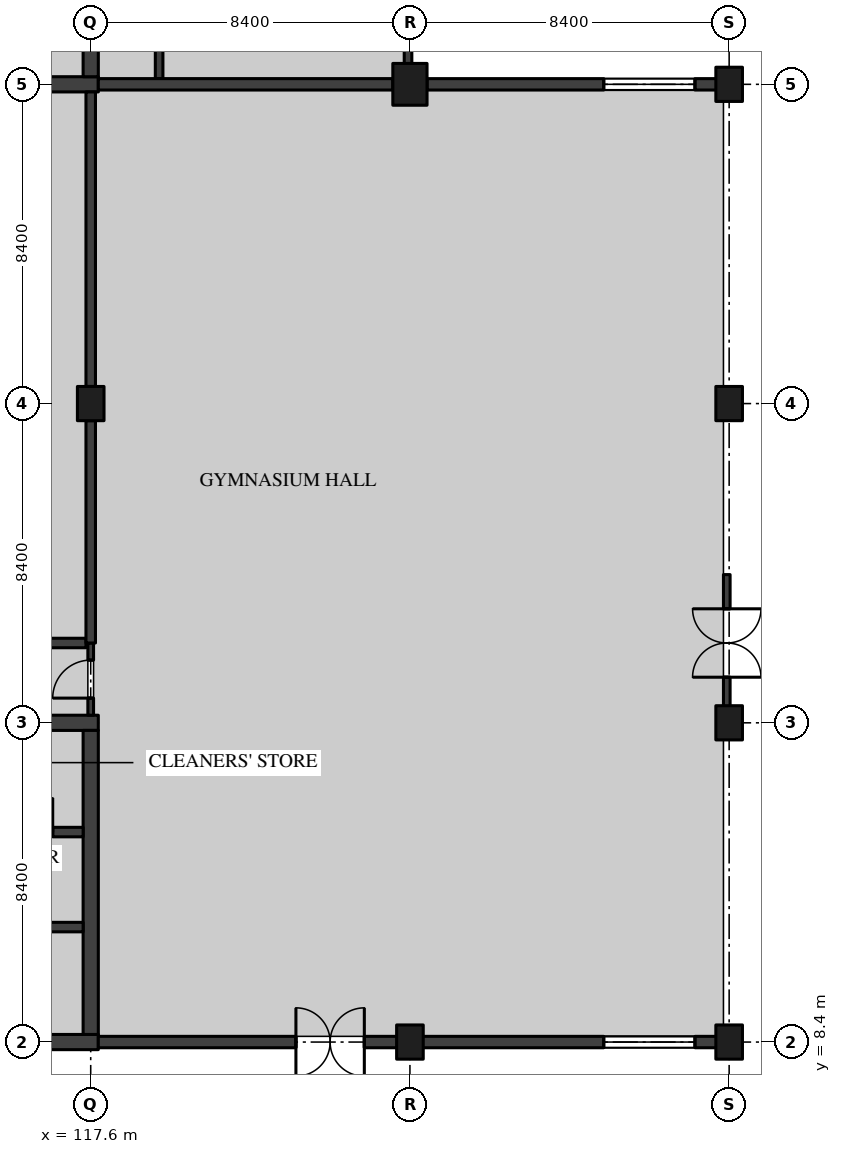
"""IFC4 building model, lengths in metres.
Left out: names, types, materials, properties, quantities, classifications, styles, units other than length and angle.
Written with IfcOpenShell. Run it as: python <this file> out.ifc"""

import sys

from ifc_helpers import new_model, si_unit, direction, frame, frame_2d, origin, origin_2d, place, context, subcontext, project, spatial, rectangle, extrude, element, fill, save


model = new_model("IFC4")
c1 = context("Model", 3, precision=1e-05, world=origin(), true_north=direction((0.0, 1.0)))
c2 = subcontext(c1, "Body", "Model", "MODEL_VIEW")
j1 = project(units=[si_unit("LENGTHUNIT", "METRE"), si_unit("PLANEANGLEUNIT", "RADIAN")], contexts=[c1])
p1 = place(None, origin())
s1 = spatial("IfcSite", under=j1, at=p1, CompositionType="ELEMENT")
p2 = place(p1, origin())
s2 = spatial("IfcBuilding", under=s1, at=p2, CompositionType="ELEMENT")
p3 = place(p2, origin())
s3 = spatial("IfcBuildingStorey", under=s2, at=p3, CompositionType="ELEMENT", Elevation=0.0)
p4 = place(p3, frame((117.6, 25.2, 0.0), z_axis=(0.0, 0.0, 1.0), x_axis=(1.0, 0.0, 0.0)))
e1 = element("IfcColumn", 1, at=p4, inside=s3, PredefinedType="COLUMN", context=c2, shape_type="SweptSolid", body=[
    extrude(rectangle(XDim=0.7, YDim=0.9, at=origin_2d()), origin(), (0.0, 0.0, 1.0), 5.05),
])
p5 = place(p3, frame((126.0, 8.4, 0.0), z_axis=(0.0, 0.0, 1.0), x_axis=(1.0, 0.0, 0.0)))
e2 = element("IfcColumn", 2, at=p5, inside=s3, PredefinedType="COLUMN", context=c2, shape_type="SweptSolid", body=[
    extrude(rectangle(XDim=0.7, YDim=0.9, at=origin_2d()), origin(), (0.0, 0.0, 1.0), 5.4),
])
p6 = place(p3, frame((126.0, 33.6, 0.0), z_axis=(0.0, 0.0, 1.0), x_axis=(1.0, 0.0, 0.0)))
e3 = element("IfcColumn", 3, at=p6, inside=s3, PredefinedType="COLUMN", context=c2, shape_type="SweptSolid", body=[
    extrude(rectangle(XDim=0.9, YDim=1.1, at=origin_2d()), origin(), (0.0, 0.0, 1.0), 5.05),
])
for number, where, z_axis, x_axis in (
    (4, (134.4, 8.4, 0.0), (0.0, 0.0, 1.0), (1.0, 0.0, 0.0)),
    (5, (134.4, 16.8, 0.0), (0.0, 0.0, 1.0), (1.0, 0.0, 0.0)),
    (6, (134.4, 25.2, 0.0), (0.0, 0.0, 1.0), (1.0, 0.0, 0.0)),
    (7, (134.4, 33.6, 0.0), (0.0, 0.0, 1.0), (1.0, 0.0, 0.0)),
):
    element("IfcColumn", number, at=place(p3, frame(where, z_axis=z_axis, x_axis=x_axis)), inside=s3, PredefinedType="COLUMN", context=c2, shape_type="SweptSolid", body=[
        extrude(rectangle(XDim=0.7, YDim=0.9, at=origin_2d()), origin(), (0.0, 0.0, 1.0), 5.4),
    ])
p7 = place(p3, frame((109.0, 8.4, 0.0), z_axis=(0.0, 0.0, 1.0), x_axis=(1.0, 0.0, 0.0)))
e8 = element("IfcWall", 8, at=p7, inside=s3, PredefinedType="SHEAR", context=c2, shape_type="SweptSolid", body=[
    extrude(rectangle(XDim=8.8, YDim=0.4, at=frame_2d((4.4, 0.0))), origin(), (0.0, 0.0, 1.0), 5.05),
])
p8 = place(p7, frame((0.55, 0.0, 0.0)))
e9 = element("IfcOpeningElement", 9, at=p8, cuts=e8, PredefinedType="OPENING", context=c2, shape_type="SweptSolid", body=[
    extrude(rectangle(XDim=1.2, YDim=2.1, at=frame_2d((0.6, 1.05))), frame((0.0, 0.21, 0.0), z_axis=(0.0, -1.0, 0.0), x_axis=(1.0, 0.0, 0.0)), (0.0, 0.0, 1.0), 0.42),
])
p9 = place(p3, frame((109.0, 16.8, 0.0), z_axis=(0.0, 0.0, 1.0), x_axis=(1.0, 0.0, 0.0)))
e10 = element("IfcWall", 10, at=p9, inside=s3, PredefinedType="SHEAR", context=c2, shape_type="SweptSolid", body=[
    extrude(rectangle(XDim=8.8, YDim=0.4, at=frame_2d((4.4, 0.0))), origin(), (0.0, 0.0, 1.0), 5.05),
])
p10 = place(p9, frame((1.0, 0.0, 0.0)))
e11 = element("IfcOpeningElement", 11, at=p10, cuts=e10, PredefinedType="OPENING", context=c2, shape_type="SweptSolid", body=[
    extrude(rectangle(XDim=1.2, YDim=2.1, at=frame_2d((0.6, 1.05))), frame((0.0, 0.21, 0.0), z_axis=(0.0, -1.0, 0.0), x_axis=(1.0, 0.0, 0.0)), (0.0, 0.0, 1.0), 0.42),
])
p11 = place(p3, frame((117.6, 8.6, 0.0), z_axis=(0.0, 0.0, 1.0), x_axis=(0.0, 1.0, 0.0)))
e12 = element("IfcWall", 12, at=p11, inside=s3, PredefinedType="SHEAR", context=c2, shape_type="SweptSolid", body=[
    extrude(rectangle(XDim=8.0, YDim=0.4, at=frame_2d((4.0, 0.0))), origin(), (0.0, 0.0, 1.0), 5.05),
])
p12 = place(p3, frame((109.4, 11.425, 0.0), z_axis=(0.0, 0.0, 1.0), x_axis=(1.0, 0.0, 0.0)))
e13 = element("IfcWall", 13, at=p12, inside=s3, PredefinedType="SOLIDWALL", context=c2, shape_type="SweptSolid", body=[
    extrude(rectangle(XDim=8.0, YDim=0.25, at=frame_2d((4.0, 0.0))), origin(), (0.0, 0.0, 1.0), 5.05),
])
p13 = place(p12, frame((0.2, 0.0, 0.0)))
e14 = element("IfcOpeningElement", 14, at=p13, cuts=e13, PredefinedType="OPENING", context=c2, shape_type="SweptSolid", body=[
    extrude(rectangle(XDim=1.1, YDim=2.1, at=frame_2d((0.55, 1.05))), frame((0.0, 0.135, 0.0), z_axis=(0.0, -1.0, 0.0), x_axis=(1.0, 0.0, 0.0)), (0.0, 0.0, 1.0), 0.27),
])
p14 = place(p3, frame((112.05, 13.925, 0.0), z_axis=(0.0, 0.0, 1.0), x_axis=(1.0, 0.0, 0.0)))
e15 = element("IfcWall", 15, at=p14, inside=s3, PredefinedType="SOLIDWALL", context=c2, shape_type="SweptSolid", body=[
    extrude(rectangle(XDim=5.35, YDim=0.25, at=frame_2d((2.675, 0.0))), origin(), (0.0, 0.0, 1.0), 5.05),
])
p15 = place(p14, frame((3.65, 0.0, 0.0)))
e16 = element("IfcOpeningElement", 16, at=p15, cuts=e15, PredefinedType="OPENING", context=c2, shape_type="SweptSolid", body=[
    extrude(rectangle(XDim=0.9, YDim=2.1, at=frame_2d((0.45, 1.05))), frame((0.0, 0.135, 0.0), z_axis=(0.0, -1.0, 0.0), x_axis=(1.0, 0.0, 0.0)), (0.0, 0.0, 1.0), 0.27),
])
p16 = place(p14, frame((0.9, 0.0, 0.0)))
e17 = element("IfcOpeningElement", 17, at=p16, cuts=e15, PredefinedType="OPENING", context=c2, shape_type="SweptSolid", body=[
    extrude(rectangle(XDim=0.8, YDim=2.1, at=frame_2d((0.4, 1.05))), frame((0.0, 0.135, 0.0), z_axis=(0.0, -1.0, 0.0), x_axis=(1.0, 0.0, 0.0)), (0.0, 0.0, 1.0), 0.27),
])
p17 = place(p3, frame((109.0, 33.6, 0.0), z_axis=(0.0, 0.0, 1.0), x_axis=(1.0, 0.0, 0.0)))
e18 = element("IfcWall", 18, at=p17, inside=s3, PredefinedType="SHEAR", context=c2, shape_type="SweptSolid", body=[
    extrude(rectangle(XDim=8.8, YDim=0.4, at=frame_2d((4.4, 0.0))), origin(), (0.0, 0.0, 1.0), 5.05),
])
p18 = place(p3, frame((117.6, 33.8, 0.0), z_axis=(0.0, 0.0, 1.0), x_axis=(0.0, 1.0, 0.0)))
e19 = element("IfcWall", 19, at=p18, inside=s3, PredefinedType="SHEAR", context=c2, shape_type="SweptSolid", body=[
    extrude(rectangle(XDim=8.0, YDim=0.4, at=frame_2d((4.0, 0.0))), origin(), (0.0, 0.0, 1.0), 5.05),
])
p19 = place(p18, frame((3.875, 0.0, 0.0)))
e20 = element("IfcOpeningElement", 20, at=p19, cuts=e19, PredefinedType="OPENING", context=c2, shape_type="SweptSolid", body=[
    extrude(rectangle(XDim=1.2, YDim=2.1, at=frame_2d((0.6, 1.05))), frame((0.0, 0.21, 0.0), z_axis=(0.0, -1.0, 0.0), x_axis=(1.0, 0.0, 0.0)), (0.0, 0.0, 1.0), 0.42),
])
p20 = place(p3, frame((117.6, 17.0, 0.0), z_axis=(0.0, 0.0, 1.0), x_axis=(0.0, 1.0, 0.0)))
e21 = element("IfcWall", 21, at=p20, inside=s3, PredefinedType="PARTITIONING", context=c2, shape_type="SweptSolid", body=[
    extrude(rectangle(XDim=1.9, YDim=0.15, at=frame_2d((0.95, 0.0))), origin(), (0.0, 0.0, 1.0), 8.375),
])
p21 = place(p20, frame((0.45, 0.0, 0.0)))
e22 = element("IfcOpeningElement", 22, at=p21, cuts=e21, PredefinedType="OPENING", context=c2, shape_type="SweptSolid", body=[
    extrude(rectangle(XDim=1.0, YDim=2.1, at=frame_2d((0.5, 1.05))), frame((0.0, 0.085, 0.0), z_axis=(0.0, -1.0, 0.0), x_axis=(1.0, 0.0, 0.0)), (0.0, 0.0, 1.0), 0.17),
])
p22 = place(p3, frame((100.925, 18.9, 0.0), z_axis=(0.0, 0.0, 1.0), x_axis=(1.0, 0.0, 0.0)))
e23 = element("IfcWall", 23, at=p22, inside=s3, PredefinedType="PARTITIONING", context=c2, shape_type="SweptSolid", body=[
    extrude(rectangle(XDim=16.55, YDim=0.25, at=frame_2d((8.275, 0.0))), origin(), (0.0, 0.0, 1.0), 5.05),
])
p23 = place(p22, frame((7.65, 0.0, 0.0)))
e24 = element("IfcOpeningElement", 24, at=p23, cuts=e23, PredefinedType="OPENING", context=c2, shape_type="SweptSolid", body=[
    extrude(rectangle(XDim=1.2, YDim=2.1, at=frame_2d((0.6, 1.05))), frame((0.0, 0.135, 0.0), z_axis=(0.0, -1.0, 0.0), x_axis=(1.0, 0.0, 0.0)), (0.0, 0.0, 1.0), 0.27),
])
p24 = place(p3, frame((117.6, 18.9, 0.0), z_axis=(0.0, 0.0, 1.0), x_axis=(0.0, 1.0, 0.0)))
e25 = element("IfcWall", 25, at=p24, inside=s3, PredefinedType="PARTITIONING", context=c2, shape_type="SweptSolid", body=[
    extrude(rectangle(XDim=5.85, YDim=0.25, at=frame_2d((2.925, 0.0))), origin(), (0.0, 0.0, 1.0), 8.375),
])
p25 = place(p3, frame((117.6, 25.65, 0.0), z_axis=(0.0, 0.0, 1.0), x_axis=(0.0, 1.0, 0.0)))
e26 = element("IfcWall", 26, at=p25, inside=s3, PredefinedType="PARTITIONING", context=c2, shape_type="SweptSolid", body=[
    extrude(rectangle(XDim=7.75, YDim=0.25, at=frame_2d((3.875, 0.0))), origin(), (0.0, 0.0, 1.0), 8.375),
])
p26 = place(p3, frame((119.4, 33.75, 0.0), z_axis=(0.0, 0.0, 1.0), x_axis=(0.0, 1.0, 0.0)))
e27 = element("IfcWall", 27, at=p26, inside=s3, PredefinedType="PARTITIONING", context=c2, shape_type="SweptSolid", body=[
    extrude(rectangle(XDim=8.25, YDim=0.2, at=frame_2d((4.125, 0.0))), origin(), (0.0, 0.0, 1.0), 5.05),
])
p27 = place(p26, frame((3.6, 0.0, 0.0)))
e28 = element("IfcOpeningElement", 28, at=p27, cuts=e27, PredefinedType="OPENING", context=c2, shape_type="SweptSolid", body=[
    extrude(rectangle(XDim=1.0, YDim=2.4, at=frame_2d((0.5, 1.2))), frame((0.0, 0.11, 0.0), z_axis=(0.0, -1.0, 0.0), x_axis=(1.0, 0.0, 0.0)), (0.0, 0.0, 1.0), 0.22),
])
p28 = place(p3, frame((117.8, 8.4, 0.0), z_axis=(0.0, 0.0, 1.0), x_axis=(1.0, 0.0, 0.0)))
e29 = element("IfcWall", 29, at=p28, inside=s3, PredefinedType="SOLIDWALL", context=c2, shape_type="SweptSolid", body=[
    extrude(rectangle(XDim=7.87, YDim=0.3, at=frame_2d((3.935, 0.0))), origin(), (0.0, 0.0, 1.0), 5.4),
])
p29 = place(p28, frame((5.2, 0.0, 0.0)))
e30 = element("IfcOpeningElement", 30, at=p29, cuts=e29, PredefinedType="OPENING", context=c2, shape_type="SweptSolid", body=[
    extrude(rectangle(XDim=1.8, YDim=2.4, at=frame_2d((0.9, 1.2))), frame((0.0, 0.16, 0.0), z_axis=(0.0, -1.0, 0.0), x_axis=(1.0, 0.0, 0.0)), (0.0, 0.0, 1.0), 0.32),
])
p30 = place(p3, frame((126.33, 8.4, 0.0), z_axis=(0.0, 0.0, 1.0), x_axis=(1.0, 0.0, 0.0)))
e31 = element("IfcWall", 31, at=p30, inside=s3, PredefinedType="SOLIDWALL", context=c2, shape_type="SweptSolid", body=[
    extrude(rectangle(XDim=7.74, YDim=0.3, at=frame_2d((3.87, 0.0))), origin(), (0.0, 0.0, 1.0), 5.4),
])
p31 = place(p30, frame((4.77, 0.0, 0.6)))
e32 = element("IfcOpeningElement", 32, at=p31, cuts=e31, PredefinedType="OPENING", context=c2, shape_type="SweptSolid", body=[
    extrude(rectangle(XDim=2.4, YDim=2.1, at=frame_2d((1.2, 1.05))), frame((0.0, 0.16, 0.0), z_axis=(0.0, -1.0, 0.0), x_axis=(1.0, 0.0, 0.0)), (0.0, 0.0, 1.0), 0.32),
])
p32 = place(p3, frame((134.337, 17.23, 0.0), z_axis=(0.0, 0.0, 1.0), x_axis=(0.0, 1.0, 0.0)))
e33 = element("IfcWall", 33, at=p32, inside=s3, PredefinedType="SOLIDWALL", context=c2, shape_type="SweptSolid", body=[
    extrude(rectangle(XDim=3.47, YDim=0.175, at=frame_2d((1.735, 0.0))), origin(), (0.0, 0.0, 1.0), 5.4),
])
p33 = place(p32, frame((0.77, 0.0, 0.0)))
e34 = element("IfcOpeningElement", 34, at=p33, cuts=e33, PredefinedType="OPENING", context=c2, shape_type="SweptSolid", body=[
    extrude(rectangle(XDim=1.8, YDim=2.4, at=frame_2d((0.9, 1.2))), frame((0.0, 0.098, 0.0), z_axis=(0.0, -1.0, 0.0), x_axis=(1.0, 0.0, 0.0)), (0.0, 0.0, 1.0), 0.195),
])
p34 = place(p3, frame((126.45, 33.6, 5.05), z_axis=(0.0, 0.0, 1.0), x_axis=(-1.0, 0.0, 0.0)))
e35 = element("IfcWall", 35, at=p34, inside=s3, PredefinedType="SOLIDWALL", context=c2, shape_type="SweptSolid", body=[
    extrude(rectangle(XDim=0.9, YDim=0.3, at=frame_2d((0.45, 0.0))), origin(), (0.0, 0.0, 1.0), 0.35),
])
p35 = place(p3, frame((134.07, 33.6, 0.0), z_axis=(0.0, 0.0, 1.0), x_axis=(-1.0, 0.0, 0.0)))
e36 = element("IfcWall", 36, at=p35, inside=s3, PredefinedType="SOLIDWALL", context=c2, shape_type="SweptSolid", body=[
    extrude(rectangle(XDim=7.62, YDim=0.3, at=frame_2d((3.81, 0.0))), origin(), (0.0, 0.0, 1.0), 5.4),
])
p36 = place(p35, frame((0.57, 0.0, 0.6)))
e37 = element("IfcOpeningElement", 37, at=p36, cuts=e36, PredefinedType="OPENING", context=c2, shape_type="SweptSolid", body=[
    extrude(rectangle(XDim=2.4, YDim=2.1, at=frame_2d((1.2, 1.05))), frame((0.0, 0.16, 0.0), z_axis=(0.0, -1.0, 0.0), x_axis=(1.0, 0.0, 0.0)), (0.0, 0.0, 1.0), 0.32),
])
p37 = place(p3, frame((125.95, 34.13, 0.0), z_axis=(0.0, 0.0, 1.0), x_axis=(0.0, 1.0, 0.0)))
e38 = element("IfcWall", 38, at=p37, inside=s3, PredefinedType="SOLIDWALL", context=c2, shape_type="SweptSolid", body=[
    extrude(rectangle(XDim=3.37, YDim=0.2, at=frame_2d((1.685, 0.0))), origin(), (0.0, 0.0, 1.0), 5.05),
])
p38 = place(p37, frame((0.67, 0.0, 0.0)))
e39 = element("IfcOpeningElement", 39, at=p38, cuts=e38, PredefinedType="OPENING", context=c2, shape_type="SweptSolid", body=[
    extrude(rectangle(XDim=1.8, YDim=2.4, at=frame_2d((0.9, 1.2))), frame((0.0, 0.11, 0.0), z_axis=(0.0, -1.0, 0.0), x_axis=(1.0, 0.0, 0.0)), (0.0, 0.0, 1.0), 0.22),
])
p39 = place(p3, frame((125.55, 33.6, 0.0), z_axis=(0.0, 0.0, 1.0), x_axis=(-1.0, 0.0, 0.0)))
e40 = element("IfcWall", 40, at=p39, inside=s3, PredefinedType="SOLIDWALL", context=c2, shape_type="SweptSolid", body=[
    extrude(rectangle(XDim=7.75, YDim=0.3, at=frame_2d((3.875, 0.0))), origin(), (0.0, 0.0, 1.0), 5.4),
])
p40 = place(p21, origin())
e41 = element("IfcDoor", 41, at=p40, inside=s3, OperationType="SINGLE_SWING_RIGHT", PredefinedType="DOOR", context=c2, shape_type="SweptSolid", body=[
    extrude(rectangle(XDim=1.0, YDim=2.1, at=frame_2d((0.5, 1.05))), frame((0.0, 0.025, 0.0), z_axis=(0.0, -1.0, 0.0), x_axis=(1.0, 0.0, 0.0)), (0.0, 0.0, 1.0), 0.05),
])
fill(e22, e41)
p41 = place(p29, frame((1.8, 0.0, 0.0), z_axis=(0.0, 0.0, 1.0), x_axis=(-1.0, 0.0, 0.0)))
e42 = element("IfcDoor", 42, at=p41, inside=s3, OperationType="DOUBLE_DOOR_DOUBLE_SWING", PredefinedType="DOOR", context=c2, shape_type="SweptSolid", body=[
    extrude(rectangle(XDim=1.8, YDim=2.4, at=frame_2d((0.9, 1.2))), frame((0.0, 0.025, 0.0), z_axis=(0.0, -1.0, 0.0), x_axis=(1.0, 0.0, 0.0)), (0.0, 0.0, 1.0), 0.05),
])
fill(e30, e42)
p42 = place(p31, origin())
e43 = element("IfcWindow", 43, at=p42, inside=s3, PartitioningType="SINGLE_PANEL", PredefinedType="WINDOW", context=c2, shape_type="SweptSolid", body=[
    extrude(rectangle(XDim=2.4, YDim=2.1, at=frame_2d((1.2, 1.05))), frame((0.0, 0.06, 0.0), z_axis=(0.0, -1.0, 0.0), x_axis=(1.0, 0.0, 0.0)), (0.0, 0.0, 1.0), 0.12),
])
fill(e32, e43)
p43 = place(p33, frame((1.8, 0.0, 0.0), z_axis=(0.0, 0.0, 1.0), x_axis=(-1.0, 0.0, 0.0)))
e44 = element("IfcDoor", 44, at=p43, inside=s3, OperationType="DOUBLE_DOOR_DOUBLE_SWING", PredefinedType="DOOR", context=c2, shape_type="SweptSolid", body=[
    extrude(rectangle(XDim=1.8, YDim=2.4, at=frame_2d((0.9, 1.2))), frame((0.0, 0.025, 0.0), z_axis=(0.0, -1.0, 0.0), x_axis=(1.0, 0.0, 0.0)), (0.0, 0.0, 1.0), 0.05),
])
fill(e34, e44)
p44 = place(p36, origin())
e45 = element("IfcWindow", 45, at=p44, inside=s3, PartitioningType="SINGLE_PANEL", PredefinedType="WINDOW", context=c2, shape_type="SweptSolid", body=[
    extrude(rectangle(XDim=2.4, YDim=2.1, at=frame_2d((1.2, 1.05))), frame((0.0, 0.06, 0.0), z_axis=(0.0, -1.0, 0.0), x_axis=(1.0, 0.0, 0.0)), (0.0, 0.0, 1.0), 0.12),
])
fill(e37, e45)
save(model, sys.argv[1])
